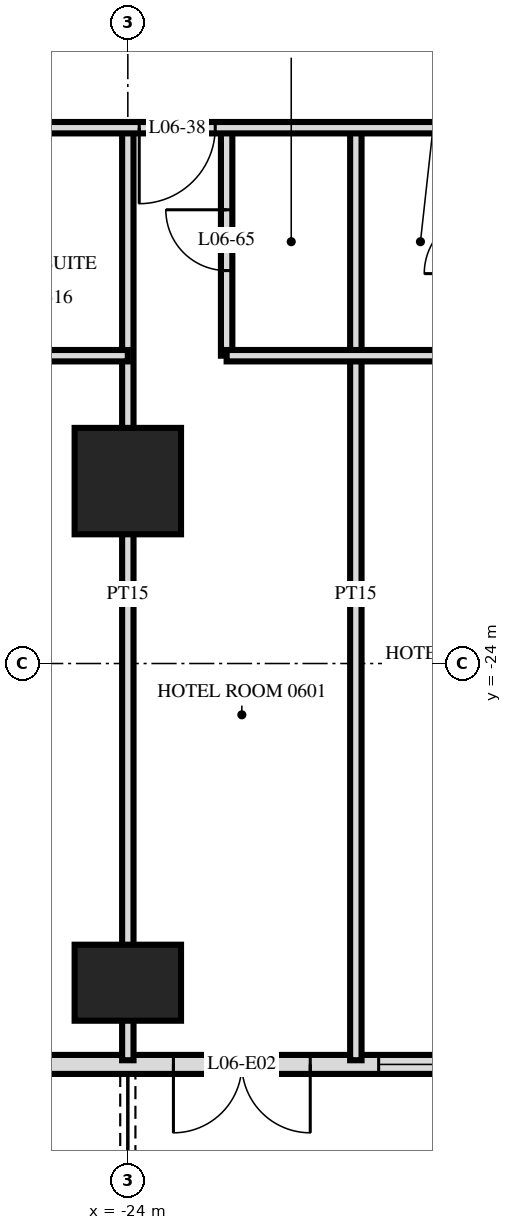
"""IFC4 building model, lengths in metres.
Left out: names, types, materials, properties, quantities, classifications, styles, units other than length and angle.
Written with IfcOpenShell. Run it as: python <this file> out.ifc"""

import sys

from ifc_helpers import new_model, si_unit, direction, frame, frame_2d, origin, origin_2d, place, context, subcontext, project, spatial, rectangle, extrude, element, fill, save


model = new_model("IFC4")
c1 = context("Model", 3, precision=1e-05, world=origin(), true_north=direction((0.0, 1.0)))
c2 = subcontext(c1, "Body", "Model", "MODEL_VIEW")
j1 = project(units=[si_unit("LENGTHUNIT", "METRE"), si_unit("PLANEANGLEUNIT", "RADIAN")], contexts=[c1])
p1 = place(None, origin())
s1 = spatial("IfcSite", under=j1, at=p1, CompositionType="ELEMENT")
p2 = place(p1, origin())
s2 = spatial("IfcBuilding", under=s1, at=p2, CompositionType="ELEMENT")
p3 = place(p2, frame((0.0, 0.0, 31.2)))
s3 = spatial("IfcBuildingStorey", under=s2, at=p3, CompositionType="ELEMENT", Elevation=31.2)
p4 = place(p3, frame((-24.0, -28.2, 0.0), z_axis=(0.0, 0.0, 1.0), x_axis=(1.0, 0.0, 0.0)))
e1 = element("IfcColumn", 1, at=p4, inside=s3, PredefinedType="COLUMN", context=c2, shape_type="SweptSolid", body=[
    extrude(rectangle(XDim=1.4, YDim=1.0, at=origin_2d()), origin(), (0.0, 0.0, 1.0), 3.6),
])
p5 = place(p3, frame((-24.0, -21.6, 0.0), z_axis=(0.0, 0.0, 1.0), x_axis=(1.0, 0.0, 0.0)))
e2 = element("IfcColumn", 2, at=p5, inside=s3, PredefinedType="COLUMN", context=c2, shape_type="SweptSolid", body=[
    extrude(rectangle(XDim=1.4, YDim=1.4, at=origin_2d()), origin(), (0.0, 0.0, 1.0), 3.6),
])
p6 = place(p3, frame((-28.775, -29.275, 0.0), z_axis=(0.0, 0.0, 1.0), x_axis=(1.0, 0.0, 0.0)))
e3 = element("IfcWall", 3, at=p6, inside=s3, PredefinedType="SOLIDWALL", context=c2, shape_type="SweptSolid", body=[
    extrude(rectangle(XDim=57.551, YDim=0.25, at=frame_2d((28.775, 0.0))), origin(), (0.0, 0.0, 1.0), 3.32),
])
p7 = place(p6, frame((0.575, 0.0, 0.0)))
e4 = element("IfcOpeningElement", 4, at=p7, cuts=e3, PredefinedType="OPENING", context=c2, shape_type="SweptSolid", body=[
    extrude(rectangle(XDim=1.8, YDim=2.4, at=frame_2d((0.9, 1.2))), frame((0.0, 0.135, 0.0), z_axis=(0.0, -1.0, 0.0), x_axis=(1.0, 0.0, 0.0)), (0.0, 0.0, 1.0), 0.27),
])
p8 = place(p6, frame((5.375, 0.0, 0.0)))
e5 = element("IfcOpeningElement", 5, at=p8, cuts=e3, PredefinedType="OPENING", context=c2, shape_type="SweptSolid", body=[
    extrude(rectangle(XDim=1.8, YDim=2.4, at=frame_2d((0.9, 1.2))), frame((0.0, 0.135, 0.0), z_axis=(0.0, -1.0, 0.0), x_axis=(1.0, 0.0, 0.0)), (0.0, 0.0, 1.0), 0.27),
])
p9 = place(p6, frame((8.075, 0.0, 0.3)))
e6 = element("IfcOpeningElement", 6, at=p9, cuts=e3, PredefinedType="OPENING", context=c2, shape_type="SweptSolid", body=[
    extrude(rectangle(XDim=2.4, YDim=2.1, at=frame_2d((1.2, 1.05))), frame((0.0, 0.135, 0.0), z_axis=(0.0, -1.0, 0.0), x_axis=(1.0, 0.0, 0.0)), (0.0, 0.0, 1.0), 0.27),
])
p10 = place(p6, frame((11.375, 0.0, 0.0)))
e7 = element("IfcOpeningElement", 7, at=p10, cuts=e3, PredefinedType="OPENING", context=c2, shape_type="SweptSolid", body=[
    extrude(rectangle(XDim=1.8, YDim=2.4, at=frame_2d((0.9, 1.2))), frame((0.0, 0.135, 0.0), z_axis=(0.0, -1.0, 0.0), x_axis=(1.0, 0.0, 0.0)), (0.0, 0.0, 1.0), 0.27),
])
p11 = place(p6, frame((14.075, 0.0, 0.3)))
e8 = element("IfcOpeningElement", 8, at=p11, cuts=e3, PredefinedType="OPENING", context=c2, shape_type="SweptSolid", body=[
    extrude(rectangle(XDim=2.4, YDim=2.1, at=frame_2d((1.2, 1.05))), frame((0.0, 0.135, 0.0), z_axis=(0.0, -1.0, 0.0), x_axis=(1.0, 0.0, 0.0)), (0.0, 0.0, 1.0), 0.27),
])
p12 = place(p6, frame((17.375, 0.0, 0.0)))
e9 = element("IfcOpeningElement", 9, at=p12, cuts=e3, PredefinedType="OPENING", context=c2, shape_type="SweptSolid", body=[
    extrude(rectangle(XDim=1.8, YDim=2.4, at=frame_2d((0.9, 1.2))), frame((0.0, 0.135, 0.0), z_axis=(0.0, -1.0, 0.0), x_axis=(1.0, 0.0, 0.0)), (0.0, 0.0, 1.0), 0.27),
])
p13 = place(p6, frame((20.075, 0.0, 0.3)))
e10 = element("IfcOpeningElement", 10, at=p13, cuts=e3, PredefinedType="OPENING", context=c2, shape_type="SweptSolid", body=[
    extrude(rectangle(XDim=2.4, YDim=2.1, at=frame_2d((1.2, 1.05))), frame((0.0, 0.135, 0.0), z_axis=(0.0, -1.0, 0.0), x_axis=(1.0, 0.0, 0.0)), (0.0, 0.0, 1.0), 0.27),
])
p14 = place(p6, frame((23.075, 0.0, 0.3)))
e11 = element("IfcOpeningElement", 11, at=p14, cuts=e3, PredefinedType="OPENING", context=c2, shape_type="SweptSolid", body=[
    extrude(rectangle(XDim=2.4, YDim=2.1, at=frame_2d((1.2, 1.05))), frame((0.0, 0.135, 0.0), z_axis=(0.0, -1.0, 0.0), x_axis=(1.0, 0.0, 0.0)), (0.0, 0.0, 1.0), 0.27),
])
p15 = place(p6, frame((26.375, 0.0, 0.0)))
e12 = element("IfcOpeningElement", 12, at=p15, cuts=e3, PredefinedType="OPENING", context=c2, shape_type="SweptSolid", body=[
    extrude(rectangle(XDim=1.8, YDim=2.4, at=frame_2d((0.9, 1.2))), frame((0.0, 0.135, 0.0), z_axis=(0.0, -1.0, 0.0), x_axis=(1.0, 0.0, 0.0)), (0.0, 0.0, 1.0), 0.27),
])
p16 = place(p6, frame((29.375, 0.0, 0.0)))
e13 = element("IfcOpeningElement", 13, at=p16, cuts=e3, PredefinedType="OPENING", context=c2, shape_type="SweptSolid", body=[
    extrude(rectangle(XDim=1.8, YDim=2.4, at=frame_2d((0.9, 1.2))), frame((0.0, 0.135, 0.0), z_axis=(0.0, -1.0, 0.0), x_axis=(1.0, 0.0, 0.0)), (0.0, 0.0, 1.0), 0.27),
])
p17 = place(p6, frame((32.075, 0.0, 0.3)))
e14 = element("IfcOpeningElement", 14, at=p17, cuts=e3, PredefinedType="OPENING", context=c2, shape_type="SweptSolid", body=[
    extrude(rectangle(XDim=2.4, YDim=2.1, at=frame_2d((1.2, 1.05))), frame((0.0, 0.135, 0.0), z_axis=(0.0, -1.0, 0.0), x_axis=(1.0, 0.0, 0.0)), (0.0, 0.0, 1.0), 0.27),
])
p18 = place(p6, frame((35.375, 0.0, 0.0)))
e15 = element("IfcOpeningElement", 15, at=p18, cuts=e3, PredefinedType="OPENING", context=c2, shape_type="SweptSolid", body=[
    extrude(rectangle(XDim=1.8, YDim=2.4, at=frame_2d((0.9, 1.2))), frame((0.0, 0.135, 0.0), z_axis=(0.0, -1.0, 0.0), x_axis=(1.0, 0.0, 0.0)), (0.0, 0.0, 1.0), 0.27),
])
p19 = place(p6, frame((38.075, 0.0, 0.3)))
e16 = element("IfcOpeningElement", 16, at=p19, cuts=e3, PredefinedType="OPENING", context=c2, shape_type="SweptSolid", body=[
    extrude(rectangle(XDim=2.4, YDim=2.1, at=frame_2d((1.2, 1.05))), frame((0.0, 0.135, 0.0), z_axis=(0.0, -1.0, 0.0), x_axis=(1.0, 0.0, 0.0)), (0.0, 0.0, 1.0), 0.27),
])
p20 = place(p6, frame((41.375, 0.0, 0.0)))
e17 = element("IfcOpeningElement", 17, at=p20, cuts=e3, PredefinedType="OPENING", context=c2, shape_type="SweptSolid", body=[
    extrude(rectangle(XDim=1.8, YDim=2.4, at=frame_2d((0.9, 1.2))), frame((0.0, 0.135, 0.0), z_axis=(0.0, -1.0, 0.0), x_axis=(1.0, 0.0, 0.0)), (0.0, 0.0, 1.0), 0.27),
])
p21 = place(p6, frame((44.075, 0.0, 0.3)))
e18 = element("IfcOpeningElement", 18, at=p21, cuts=e3, PredefinedType="OPENING", context=c2, shape_type="SweptSolid", body=[
    extrude(rectangle(XDim=2.4, YDim=2.1, at=frame_2d((1.2, 1.05))), frame((0.0, 0.135, 0.0), z_axis=(0.0, -1.0, 0.0), x_axis=(1.0, 0.0, 0.0)), (0.0, 0.0, 1.0), 0.27),
])
p22 = place(p6, frame((47.075, 0.0, 0.3)))
e19 = element("IfcOpeningElement", 19, at=p22, cuts=e3, PredefinedType="OPENING", context=c2, shape_type="SweptSolid", body=[
    extrude(rectangle(XDim=2.4, YDim=2.1, at=frame_2d((1.2, 1.05))), frame((0.0, 0.135, 0.0), z_axis=(0.0, -1.0, 0.0), x_axis=(1.0, 0.0, 0.0)), (0.0, 0.0, 1.0), 0.27),
])
p23 = place(p6, frame((50.375, 0.0, 0.0)))
e20 = element("IfcOpeningElement", 20, at=p23, cuts=e3, PredefinedType="OPENING", context=c2, shape_type="SweptSolid", body=[
    extrude(rectangle(XDim=1.8, YDim=2.4, at=frame_2d((0.9, 1.2))), frame((0.0, 0.135, 0.0), z_axis=(0.0, -1.0, 0.0), x_axis=(1.0, 0.0, 0.0)), (0.0, 0.0, 1.0), 0.27),
])
p24 = place(p6, frame((53.375, 0.0, 0.0)))
e21 = element("IfcOpeningElement", 21, at=p24, cuts=e3, PredefinedType="OPENING", context=c2, shape_type="SweptSolid", body=[
    extrude(rectangle(XDim=1.8, YDim=2.4, at=frame_2d((0.9, 1.2))), frame((0.0, 0.135, 0.0), z_axis=(0.0, -1.0, 0.0), x_axis=(1.0, 0.0, 0.0)), (0.0, 0.0, 1.0), 0.27),
])
p25 = place(p3, frame((-21.0, -29.22, 0.0), z_axis=(0.0, 0.0, 1.0), x_axis=(0.0, 1.0, 0.0)))
e22 = element("IfcWall", 22, at=p25, inside=s3, PredefinedType="PARTITIONING", context=c2, shape_type="SweptSolid", body=[
    extrude(rectangle(XDim=12.27, YDim=0.15, at=frame_2d((6.135, 0.0))), origin(), (0.0, 0.0, 1.0), 3.32),
])
p26 = place(p3, frame((-22.7, -19.95, 0.0), z_axis=(0.0, 0.0, 1.0), x_axis=(0.0, 1.0, 0.0)))
e23 = element("IfcWall", 23, at=p26, inside=s3, PredefinedType="PARTITIONING", context=c2, shape_type="SweptSolid", body=[
    extrude(rectangle(XDim=3.0, YDim=0.15, at=frame_2d((1.5, 0.0))), origin(), (0.0, 0.0, 1.0), 3.32),
])
p27 = place(p26, frame((1.12, 0.0, 0.0)))
e24 = element("IfcOpeningElement", 24, at=p27, cuts=e23, PredefinedType="OPENING", context=c2, shape_type="SweptSolid", body=[
    extrude(rectangle(XDim=0.8, YDim=2.1, at=frame_2d((0.4, 1.05))), frame((0.0, 0.085, 0.0), z_axis=(0.0, -1.0, 0.0), x_axis=(1.0, 0.0, 0.0)), (0.0, 0.0, 1.0), 0.17),
])
p28 = place(p3, frame((-24.0, -29.22, 0.0), z_axis=(0.0, 0.0, 1.0), x_axis=(0.0, 1.0, 0.0)))
e25 = element("IfcWall", 25, at=p28, inside=s3, PredefinedType="PARTITIONING", context=c2, shape_type="SweptSolid", body=[
    extrude(rectangle(XDim=12.27, YDim=0.15, at=frame_2d((6.135, 0.0))), origin(), (0.0, 0.0, 1.0), 3.32),
])
p29 = place(p3, frame((-27.0, -19.95, 0.0), z_axis=(0.0, 0.0, 1.0), x_axis=(1.0, 0.0, 0.0)))
e26 = element("IfcWall", 26, at=p29, inside=s3, PredefinedType="PARTITIONING", context=c2, shape_type="SweptSolid", body=[
    extrude(rectangle(XDim=3.0, YDim=0.15, at=frame_2d((1.5, 0.0))), origin(), (0.0, 0.0, 1.0), 3.32),
])
p30 = place(p3, frame((-22.7, -19.95, 0.0), z_axis=(0.0, 0.0, 1.0), x_axis=(1.0, 0.0, 0.0)))
e27 = element("IfcWall", 27, at=p30, inside=s3, PredefinedType="PARTITIONING", context=c2, shape_type="SweptSolid", body=[
    extrude(rectangle(XDim=3.4, YDim=0.15, at=frame_2d((1.7, 0.0))), origin(), (0.0, 0.0, 1.0), 3.32),
])
p31 = place(p3, frame((-33.12, -16.95, 0.0), z_axis=(0.0, 0.0, 1.0), x_axis=(1.0, 0.0, 0.0)))
e28 = element("IfcWall", 28, at=p31, inside=s3, PredefinedType="PARTITIONING", context=c2, shape_type="SweptSolid", body=[
    extrude(rectangle(XDim=66.24, YDim=0.15, at=frame_2d((33.12, 0.0))), origin(), (0.0, 0.0, 1.0), 3.32),
])
p32 = place(p31, frame((9.27, 0.0, 0.0)))
e29 = element("IfcOpeningElement", 29, at=p32, cuts=e28, PredefinedType="OPENING", context=c2, shape_type="SweptSolid", body=[
    extrude(rectangle(XDim=1.0, YDim=2.1, at=frame_2d((0.5, 1.05))), frame((0.0, 0.085, 0.0), z_axis=(0.0, -1.0, 0.0), x_axis=(1.0, 0.0, 0.0)), (0.0, 0.0, 1.0), 0.17),
])
p33 = place(p31, frame((13.97, 0.0, 0.0)))
e30 = element("IfcOpeningElement", 30, at=p33, cuts=e28, PredefinedType="OPENING", context=c2, shape_type="SweptSolid", body=[
    extrude(rectangle(XDim=1.0, YDim=2.1, at=frame_2d((0.5, 1.05))), frame((0.0, 0.085, 0.0), z_axis=(0.0, -1.0, 0.0), x_axis=(1.0, 0.0, 0.0)), (0.0, 0.0, 1.0), 0.17),
])
p34 = place(p31, frame((15.27, 0.0, 0.0)))
e31 = element("IfcOpeningElement", 31, at=p34, cuts=e28, PredefinedType="OPENING", context=c2, shape_type="SweptSolid", body=[
    extrude(rectangle(XDim=1.0, YDim=2.1, at=frame_2d((0.5, 1.05))), frame((0.0, 0.085, 0.0), z_axis=(0.0, -1.0, 0.0), x_axis=(1.0, 0.0, 0.0)), (0.0, 0.0, 1.0), 0.17),
])
p35 = place(p31, frame((19.97, 0.0, 0.0)))
e32 = element("IfcOpeningElement", 32, at=p35, cuts=e28, PredefinedType="OPENING", context=c2, shape_type="SweptSolid", body=[
    extrude(rectangle(XDim=1.0, YDim=2.1, at=frame_2d((0.5, 1.05))), frame((0.0, 0.085, 0.0), z_axis=(0.0, -1.0, 0.0), x_axis=(1.0, 0.0, 0.0)), (0.0, 0.0, 1.0), 0.17),
])
p36 = place(p31, frame((22.27, 0.0, 0.0)))
e33 = element("IfcOpeningElement", 33, at=p36, cuts=e28, PredefinedType="OPENING", context=c2, shape_type="SweptSolid", body=[
    extrude(rectangle(XDim=1.0, YDim=2.1, at=frame_2d((0.5, 1.05))), frame((0.0, 0.085, 0.0), z_axis=(0.0, -1.0, 0.0), x_axis=(1.0, 0.0, 0.0)), (0.0, 0.0, 1.0), 0.17),
])
p37 = place(p31, frame((28.97, 0.0, 0.0)))
e34 = element("IfcOpeningElement", 34, at=p37, cuts=e28, PredefinedType="OPENING", context=c2, shape_type="SweptSolid", body=[
    extrude(rectangle(XDim=1.0, YDim=2.1, at=frame_2d((0.5, 1.05))), frame((0.0, 0.085, 0.0), z_axis=(0.0, -1.0, 0.0), x_axis=(1.0, 0.0, 0.0)), (0.0, 0.0, 1.0), 0.17),
])
p38 = place(p31, frame((30.27, 0.0, 0.0)))
e35 = element("IfcOpeningElement", 35, at=p38, cuts=e28, PredefinedType="OPENING", context=c2, shape_type="SweptSolid", body=[
    extrude(rectangle(XDim=1.0, YDim=2.1, at=frame_2d((0.5, 1.05))), frame((0.0, 0.085, 0.0), z_axis=(0.0, -1.0, 0.0), x_axis=(1.0, 0.0, 0.0)), (0.0, 0.0, 1.0), 0.17),
])
p39 = place(p31, frame((34.97, 0.0, 0.0)))
e36 = element("IfcOpeningElement", 36, at=p39, cuts=e28, PredefinedType="OPENING", context=c2, shape_type="SweptSolid", body=[
    extrude(rectangle(XDim=1.0, YDim=2.1, at=frame_2d((0.5, 1.05))), frame((0.0, 0.085, 0.0), z_axis=(0.0, -1.0, 0.0), x_axis=(1.0, 0.0, 0.0)), (0.0, 0.0, 1.0), 0.17),
])
p40 = place(p31, frame((36.27, 0.0, 0.0)))
e37 = element("IfcOpeningElement", 37, at=p40, cuts=e28, PredefinedType="OPENING", context=c2, shape_type="SweptSolid", body=[
    extrude(rectangle(XDim=1.0, YDim=2.1, at=frame_2d((0.5, 1.05))), frame((0.0, 0.085, 0.0), z_axis=(0.0, -1.0, 0.0), x_axis=(1.0, 0.0, 0.0)), (0.0, 0.0, 1.0), 0.17),
])
p41 = place(p31, frame((40.97, 0.0, 0.0)))
e38 = element("IfcOpeningElement", 38, at=p41, cuts=e28, PredefinedType="OPENING", context=c2, shape_type="SweptSolid", body=[
    extrude(rectangle(XDim=1.0, YDim=2.1, at=frame_2d((0.5, 1.05))), frame((0.0, 0.085, 0.0), z_axis=(0.0, -1.0, 0.0), x_axis=(1.0, 0.0, 0.0)), (0.0, 0.0, 1.0), 0.17),
])
p42 = place(p31, frame((42.27, 0.0, 0.0)))
e39 = element("IfcOpeningElement", 39, at=p42, cuts=e28, PredefinedType="OPENING", context=c2, shape_type="SweptSolid", body=[
    extrude(rectangle(XDim=1.0, YDim=2.1, at=frame_2d((0.5, 1.05))), frame((0.0, 0.085, 0.0), z_axis=(0.0, -1.0, 0.0), x_axis=(1.0, 0.0, 0.0)), (0.0, 0.0, 1.0), 0.17),
])
p43 = place(p31, frame((46.97, 0.0, 0.0)))
e40 = element("IfcOpeningElement", 40, at=p43, cuts=e28, PredefinedType="OPENING", context=c2, shape_type="SweptSolid", body=[
    extrude(rectangle(XDim=1.0, YDim=2.1, at=frame_2d((0.5, 1.05))), frame((0.0, 0.085, 0.0), z_axis=(0.0, -1.0, 0.0), x_axis=(1.0, 0.0, 0.0)), (0.0, 0.0, 1.0), 0.17),
])
p44 = place(p31, frame((48.27, 0.0, 0.0)))
e41 = element("IfcOpeningElement", 41, at=p44, cuts=e28, PredefinedType="OPENING", context=c2, shape_type="SweptSolid", body=[
    extrude(rectangle(XDim=1.0, YDim=2.1, at=frame_2d((0.5, 1.05))), frame((0.0, 0.085, 0.0), z_axis=(0.0, -1.0, 0.0), x_axis=(1.0, 0.0, 0.0)), (0.0, 0.0, 1.0), 0.17),
])
p45 = place(p31, frame((52.97, 0.0, 0.0)))
e42 = element("IfcOpeningElement", 42, at=p45, cuts=e28, PredefinedType="OPENING", context=c2, shape_type="SweptSolid", body=[
    extrude(rectangle(XDim=1.0, YDim=2.1, at=frame_2d((0.5, 1.05))), frame((0.0, 0.085, 0.0), z_axis=(0.0, -1.0, 0.0), x_axis=(1.0, 0.0, 0.0)), (0.0, 0.0, 1.0), 0.17),
])
p46 = place(p31, frame((54.27, 0.0, 0.0)))
e43 = element("IfcOpeningElement", 43, at=p46, cuts=e28, PredefinedType="OPENING", context=c2, shape_type="SweptSolid", body=[
    extrude(rectangle(XDim=1.0, YDim=2.1, at=frame_2d((0.5, 1.05))), frame((0.0, 0.085, 0.0), z_axis=(0.0, -1.0, 0.0), x_axis=(1.0, 0.0, 0.0)), (0.0, 0.0, 1.0), 0.17),
])
p47 = place(p31, frame((4.4, 0.0, 0.0)))
e44 = element("IfcOpeningElement", 44, at=p47, cuts=e28, PredefinedType="OPENING", context=c2, shape_type="SweptSolid", body=[
    extrude(rectangle(XDim=1.0, YDim=2.1, at=frame_2d((0.5, 1.05))), frame((0.0, 0.085, 0.0), z_axis=(0.0, -1.0, 0.0), x_axis=(1.0, 0.0, 0.0)), (0.0, 0.0, 1.0), 0.17),
])
p48 = place(p31, frame((60.8, 0.0, 0.0)))
e45 = element("IfcOpeningElement", 45, at=p48, cuts=e28, PredefinedType="OPENING", context=c2, shape_type="SweptSolid", body=[
    extrude(rectangle(XDim=1.0, YDim=2.1, at=frame_2d((0.5, 1.05))), frame((0.0, 0.085, 0.0), z_axis=(0.0, -1.0, 0.0), x_axis=(1.0, 0.0, 0.0)), (0.0, 0.0, 1.0), 0.17),
])
p49 = place(p8, frame((0.9, 0.0, 0.0), z_axis=(0.0, 0.0, 1.0), x_axis=(-1.0, 0.0, 0.0)))
e46 = element("IfcDoor", 46, at=p49, inside=s3, OperationType="DOUBLE_DOOR_SINGLE_SWING", PredefinedType="DOOR", context=c2, shape_type="SweptSolid", body=[
    extrude(rectangle(XDim=1.8, YDim=2.4, at=frame_2d((0.0, 1.2))), frame((0.0, -0.025, 0.0), z_axis=(0.0, 1.0, 0.0), x_axis=(-1.0, 0.0, 0.0)), (0.0, 0.0, 1.0), 0.05),
])
fill(e5, e46)
p50 = place(p9, origin())
e47 = element("IfcWindow", 47, at=p50, inside=s3, PartitioningType="SINGLE_PANEL", PredefinedType="WINDOW", context=c2, shape_type="SweptSolid", body=[
    extrude(rectangle(XDim=2.4, YDim=2.1, at=frame_2d((1.2, 1.05))), frame((0.0, 0.03, 0.0), z_axis=(0.0, -1.0, 0.0), x_axis=(1.0, 0.0, 0.0)), (0.0, 0.0, 1.0), 0.06),
])
fill(e6, e47)
p51 = place(p32, frame((0.5, 0.0, 0.0), z_axis=(0.0, 0.0, 1.0), x_axis=(-1.0, 0.0, 0.0)))
e48 = element("IfcDoor", 48, at=p51, inside=s3, OperationType="SINGLE_SWING_LEFT", PredefinedType="DOOR", context=c2, shape_type="SweptSolid", body=[
    extrude(rectangle(XDim=1.0, YDim=2.1, at=frame_2d((0.0, 1.05))), frame((0.0, -0.025, 0.0), z_axis=(0.0, 1.0, 0.0), x_axis=(-1.0, 0.0, 0.0)), (0.0, 0.0, 1.0), 0.05),
])
fill(e29, e48)
p52 = place(p27, origin())
e49 = element("IfcDoor", 49, at=p52, inside=s3, OperationType="SINGLE_SWING_LEFT", PredefinedType="DOOR", context=c2, shape_type="SweptSolid", body=[
    extrude(rectangle(XDim=0.8, YDim=2.1, at=frame_2d((0.4, 1.05))), frame((0.0, 0.025, 0.0), z_axis=(0.0, -1.0, 0.0), x_axis=(1.0, 0.0, 0.0)), (0.0, 0.0, 1.0), 0.05),
])
fill(e24, e49)
save(model, sys.argv[1])
